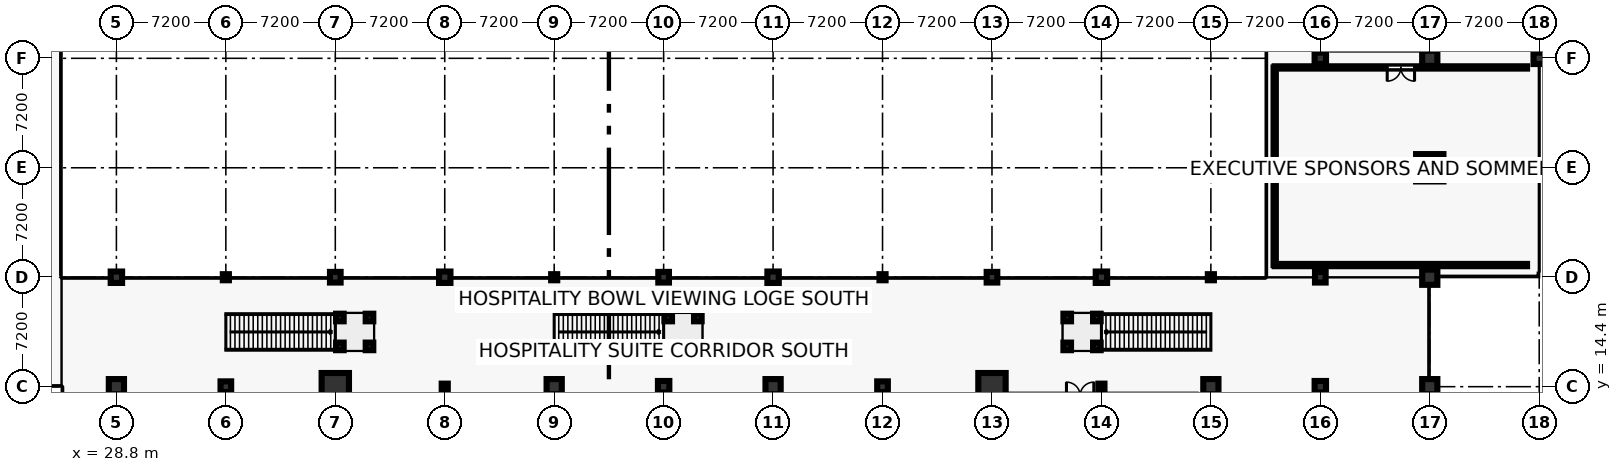
"""IFC4 building model, lengths in metres.
Left out: names, types, materials, properties, quantities, classifications, styles, units other than length and angle.
Written with IfcOpenShell. Run it as: python <this file> out.ifc"""

import sys

from ifc_helpers import new_model, si_unit, direction, frame, frame_2d, origin, origin_2d, place, context, subcontext, project, spatial, rectangle, hollow_rectangle, circle, extrude, element, fill, save


model = new_model("IFC4")
c1 = context("Model", 3, precision=1e-05, world=origin(), true_north=direction((0.0, 1.0)))
c2 = subcontext(c1, "Body", "Model", "MODEL_VIEW")
j1 = project(units=[si_unit("LENGTHUNIT", "METRE"), si_unit("PLANEANGLEUNIT", "RADIAN")], contexts=[c1])
p1 = place(None, origin())
s1 = spatial("IfcSite", under=j1, at=p1, CompositionType="ELEMENT")
p2 = place(p1, origin())
s2 = spatial("IfcBuilding", under=s1, at=p2, CompositionType="ELEMENT")
p3 = place(p2, frame((0.0, 0.0, 9.6)))
s3 = spatial("IfcBuildingStorey", under=s2, at=p3, CompositionType="ELEMENT", Elevation=9.6)
p4 = place(p3, frame((28.8, 14.4, 0.0), z_axis=(0.0, 0.0, 1.0), x_axis=(1.0, 0.0, 0.0)))
e1 = element("IfcColumn", 1, at=p4, inside=s3, PredefinedType="COLUMN", context=c2, shape_type="SweptSolid", body=[
    extrude(circle(Radius=0.5, at=origin_2d()), origin(), (0.0, 0.0, 1.0), 4.2),
])
p5 = place(p3, frame((28.8, 21.6, 0.0), z_axis=(0.0, 0.0, 1.0), x_axis=(1.0, 0.0, 0.0)))
e2 = element("IfcColumn", 2, at=p5, inside=s3, PredefinedType="COLUMN", context=c2, shape_type="SweptSolid", body=[
    extrude(rectangle(XDim=0.75, YDim=0.75, at=origin_2d()), origin(), (0.0, 0.0, 1.0), 4.2),
])
p6 = place(p3, frame((36.0, 14.4, 0.0), z_axis=(0.0, 0.0, 1.0), x_axis=(1.0, 0.0, 0.0)))
e3 = element("IfcColumn", 3, at=p6, inside=s3, PredefinedType="COLUMN", context=c2, shape_type="SweptSolid", body=[
    extrude(rectangle(XDim=0.7, YDim=0.7, at=origin_2d()), origin(), (0.0, 0.0, 1.0), 4.2),
])
p7 = place(p3, frame((36.0, 21.6, 0.0), z_axis=(0.0, 0.0, 1.0), x_axis=(1.0, 0.0, 0.0)))
e4 = element("IfcColumn", 4, at=p7, inside=s3, PredefinedType="COLUMN", context=c2, shape_type="SweptSolid", body=[
    extrude(hollow_rectangle(XDim=0.4, YDim=0.4, WallThickness=0.02, at=origin_2d()), origin(), (0.0, 0.0, 1.0), 4.2),
])
p8 = place(p3, frame((43.2, 14.4, 0.0), z_axis=(0.0, 0.0, 1.0), x_axis=(1.0, 0.0, 0.0)))
e5 = element("IfcColumn", 5, at=p8, inside=s3, PredefinedType="COLUMN", context=c2, shape_type="SweptSolid", body=[
    extrude(circle(Radius=0.9, at=origin_2d()), origin(), (0.0, 0.0, 1.0), 4.2),
])
p9 = place(p3, frame((43.2, 21.6, 0.0), z_axis=(0.0, 0.0, 1.0), x_axis=(1.0, 0.0, 0.0)))
e6 = element("IfcColumn", 6, at=p9, inside=s3, PredefinedType="COLUMN", context=c2, shape_type="SweptSolid", body=[
    extrude(rectangle(XDim=0.7, YDim=0.7, at=origin_2d()), origin(), (0.0, 0.0, 1.0), 4.2),
])
p10 = place(p3, frame((50.4, 14.4, 0.0), z_axis=(0.0, 0.0, 1.0), x_axis=(1.0, 0.0, 0.0)))
e7 = element("IfcColumn", 7, at=p10, inside=s3, PredefinedType="COLUMN", context=c2, shape_type="SweptSolid", body=[
    extrude(hollow_rectangle(XDim=0.4, YDim=0.4, WallThickness=0.02, at=origin_2d()), origin(), (0.0, 0.0, 1.0), 4.2),
])
p11 = place(p3, frame((50.4, 21.6, 0.0), z_axis=(0.0, 0.0, 1.0), x_axis=(1.0, 0.0, 0.0)))
e8 = element("IfcColumn", 8, at=p11, inside=s3, PredefinedType="COLUMN", context=c2, shape_type="SweptSolid", body=[
    extrude(rectangle(XDim=0.75, YDim=0.75, at=origin_2d()), origin(), (0.0, 0.0, 1.0), 4.2),
])
p12 = place(p3, frame((57.6, 14.4, 0.0), z_axis=(0.0, 0.0, 1.0), x_axis=(1.0, 0.0, 0.0)))
e9 = element("IfcColumn", 9, at=p12, inside=s3, PredefinedType="COLUMN", context=c2, shape_type="SweptSolid", body=[
    extrude(circle(Radius=0.5, at=origin_2d()), origin(), (0.0, 0.0, 1.0), 4.2),
])
p13 = place(p3, frame((57.6, 21.6, 0.0), z_axis=(0.0, 0.0, 1.0), x_axis=(1.0, 0.0, 0.0)))
e10 = element("IfcColumn", 10, at=p13, inside=s3, PredefinedType="COLUMN", context=c2, shape_type="SweptSolid", body=[
    extrude(hollow_rectangle(XDim=0.4, YDim=0.4, WallThickness=0.02, at=origin_2d()), origin(), (0.0, 0.0, 1.0), 4.2),
])
p14 = place(p3, frame((64.8, 14.4, 0.0), z_axis=(0.0, 0.0, 1.0), x_axis=(1.0, 0.0, 0.0)))
e11 = element("IfcColumn", 11, at=p14, inside=s3, PredefinedType="COLUMN", context=c2, shape_type="SweptSolid", body=[
    extrude(rectangle(XDim=0.75, YDim=0.75, at=origin_2d()), origin(), (0.0, 0.0, 1.0), 4.2),
])
p15 = place(p3, frame((64.8, 21.6, 0.0), z_axis=(0.0, 0.0, 1.0), x_axis=(1.0, 0.0, 0.0)))
e12 = element("IfcColumn", 12, at=p15, inside=s3, PredefinedType="COLUMN", context=c2, shape_type="SweptSolid", body=[
    extrude(rectangle(XDim=0.7, YDim=0.7, at=origin_2d()), origin(), (0.0, 0.0, 1.0), 4.2),
])
p16 = place(p3, frame((72.0, 14.4, 0.0), z_axis=(0.0, 0.0, 1.0), x_axis=(1.0, 0.0, 0.0)))
e13 = element("IfcColumn", 13, at=p16, inside=s3, PredefinedType="COLUMN", context=c2, shape_type="SweptSolid", body=[
    extrude(circle(Radius=0.5, at=origin_2d()), origin(), (0.0, 0.0, 1.0), 4.2),
])
p17 = place(p3, frame((72.0, 21.6, 0.0), z_axis=(0.0, 0.0, 1.0), x_axis=(1.0, 0.0, 0.0)))
e14 = element("IfcColumn", 14, at=p17, inside=s3, PredefinedType="COLUMN", context=c2, shape_type="SweptSolid", body=[
    extrude(rectangle(XDim=0.75, YDim=0.75, at=origin_2d()), origin(), (0.0, 0.0, 1.0), 4.2),
])
p18 = place(p3, frame((79.2, 14.4, 0.0), z_axis=(0.0, 0.0, 1.0), x_axis=(1.0, 0.0, 0.0)))
e15 = element("IfcColumn", 15, at=p18, inside=s3, PredefinedType="COLUMN", context=c2, shape_type="SweptSolid", body=[
    extrude(rectangle(XDim=0.7, YDim=0.7, at=origin_2d()), origin(), (0.0, 0.0, 1.0), 4.2),
])
p19 = place(p3, frame((79.2, 21.6, 0.0), z_axis=(0.0, 0.0, 1.0), x_axis=(1.0, 0.0, 0.0)))
e16 = element("IfcColumn", 16, at=p19, inside=s3, PredefinedType="COLUMN", context=c2, shape_type="SweptSolid", body=[
    extrude(hollow_rectangle(XDim=0.4, YDim=0.4, WallThickness=0.02, at=origin_2d()), origin(), (0.0, 0.0, 1.0), 4.2),
])
p20 = place(p3, frame((86.4, 14.4, 0.0), z_axis=(0.0, 0.0, 1.0), x_axis=(1.0, 0.0, 0.0)))
e17 = element("IfcColumn", 17, at=p20, inside=s3, PredefinedType="COLUMN", context=c2, shape_type="SweptSolid", body=[
    extrude(circle(Radius=0.9, at=origin_2d()), origin(), (0.0, 0.0, 1.0), 4.2),
])
p21 = place(p3, frame((86.4, 21.6, 0.0), z_axis=(0.0, 0.0, 1.0), x_axis=(1.0, 0.0, 0.0)))
e18 = element("IfcColumn", 18, at=p21, inside=s3, PredefinedType="COLUMN", context=c2, shape_type="SweptSolid", body=[
    extrude(rectangle(XDim=0.7, YDim=0.7, at=origin_2d()), origin(), (0.0, 0.0, 1.0), 4.2),
])
p22 = place(p3, frame((93.6, 14.4, 0.0), z_axis=(0.0, 0.0, 1.0), x_axis=(1.0, 0.0, 0.0)))
e19 = element("IfcColumn", 19, at=p22, inside=s3, PredefinedType="COLUMN", context=c2, shape_type="SweptSolid", body=[
    extrude(hollow_rectangle(XDim=0.4, YDim=0.4, WallThickness=0.02, at=origin_2d()), origin(), (0.0, 0.0, 1.0), 4.2),
])
p23 = place(p3, frame((93.6, 21.6, 0.0), z_axis=(0.0, 0.0, 1.0), x_axis=(1.0, 0.0, 0.0)))
e20 = element("IfcColumn", 20, at=p23, inside=s3, PredefinedType="COLUMN", context=c2, shape_type="SweptSolid", body=[
    extrude(rectangle(XDim=0.75, YDim=0.75, at=origin_2d()), origin(), (0.0, 0.0, 1.0), 4.2),
])
p24 = place(p3, frame((100.8, 14.4, 0.0), z_axis=(0.0, 0.0, 1.0), x_axis=(1.0, 0.0, 0.0)))
e21 = element("IfcColumn", 21, at=p24, inside=s3, PredefinedType="COLUMN", context=c2, shape_type="SweptSolid", body=[
    extrude(circle(Radius=0.5, at=origin_2d()), origin(), (0.0, 0.0, 1.0), 4.2),
])
p25 = place(p3, frame((100.8, 21.6, 0.0), z_axis=(0.0, 0.0, 1.0), x_axis=(1.0, 0.0, 0.0)))
e22 = element("IfcColumn", 22, at=p25, inside=s3, PredefinedType="COLUMN", context=c2, shape_type="SweptSolid", body=[
    extrude(hollow_rectangle(XDim=0.4, YDim=0.4, WallThickness=0.02, at=origin_2d()), origin(), (0.0, 0.0, 1.0), 4.2),
])
p26 = place(p3, frame((108.0, 14.4, 0.0), z_axis=(0.0, 0.0, 1.0), x_axis=(1.0, 0.0, 0.0)))
e23 = element("IfcColumn", 23, at=p26, inside=s3, PredefinedType="COLUMN", context=c2, shape_type="SweptSolid", body=[
    extrude(rectangle(XDim=0.75, YDim=0.75, at=origin_2d()), origin(), (0.0, 0.0, 1.0), 4.2),
])
p27 = place(p3, frame((108.0, 21.6, 0.0), z_axis=(0.0, 0.0, 1.0), x_axis=(1.0, 0.0, 0.0)))
e24 = element("IfcColumn", 24, at=p27, inside=s3, PredefinedType="COLUMN", context=c2, shape_type="SweptSolid", body=[
    extrude(rectangle(XDim=0.7, YDim=0.7, at=origin_2d()), origin(), (0.0, 0.0, 1.0), 4.2),
])
p28 = place(p3, frame((108.0, 28.8, 0.0), z_axis=(0.0, 0.0, 1.0), x_axis=(1.0, 0.0, 0.0)))
e25 = element("IfcColumn", 25, at=p28, inside=s3, PredefinedType="COLUMN", context=c2, shape_type="SweptSolid", body=[
    extrude(hollow_rectangle(XDim=0.4, YDim=0.4, WallThickness=0.02, at=origin_2d()), origin(), (0.0, 0.0, 1.0), 4.2),
])
p29 = place(p3, frame((108.0, 36.0, 0.0), z_axis=(0.0, 0.0, 1.0), x_axis=(1.0, 0.0, 0.0)))
e26 = element("IfcColumn", 26, at=p29, inside=s3, PredefinedType="COLUMN", context=c2, shape_type="SweptSolid", body=[
    extrude(rectangle(XDim=0.75, YDim=0.75, at=origin_2d()), origin(), (0.0, 0.0, 1.0), 4.2),
])
for number, where, z_axis, x_axis in (
    (27, (115.2, 14.4, 0.0), (0.0, 0.0, 1.0), (1.0, 0.0, 0.0)),
    (28, (115.2, 21.6, 0.0), (0.0, 0.0, 1.0), (1.0, 0.0, 0.0)),
):
    element("IfcColumn", number, at=place(p3, frame(where, z_axis=z_axis, x_axis=x_axis)), inside=s3, PredefinedType="COLUMN", context=c2, shape_type="SweptSolid", body=[
        extrude(circle(Radius=0.5, at=origin_2d()), origin(), (0.0, 0.0, 1.0), 4.2),
    ])
p30 = place(p3, frame((115.2, 28.8, 0.0), z_axis=(0.0, 0.0, 1.0), x_axis=(1.0, 0.0, 0.0)))
e29 = element("IfcColumn", 29, at=p30, inside=s3, PredefinedType="COLUMN", context=c2, shape_type="SweptSolid", body=[
    extrude(circle(Radius=0.9, at=origin_2d()), origin(), (0.0, 0.0, 1.0), 4.2),
])
p31 = place(p3, frame((115.2, 36.0, 0.0), z_axis=(0.0, 0.0, 1.0), x_axis=(1.0, 0.0, 0.0)))
e30 = element("IfcColumn", 30, at=p31, inside=s3, PredefinedType="COLUMN", context=c2, shape_type="SweptSolid", body=[
    extrude(circle(Radius=0.5, at=origin_2d()), origin(), (0.0, 0.0, 1.0), 4.2),
])
p32 = place(p3, frame((122.4, 28.8, 0.0), z_axis=(0.0, 0.0, 1.0), x_axis=(1.0, 0.0, 0.0)))
e31 = element("IfcColumn", 31, at=p32, inside=s3, PredefinedType="COLUMN", context=c2, shape_type="SweptSolid", body=[
    extrude(hollow_rectangle(XDim=0.4, YDim=0.4, WallThickness=0.02, at=origin_2d()), origin(), (0.0, 0.0, 1.0), 4.2),
])
p33 = place(p3, frame((122.4, 36.0, 0.0), z_axis=(0.0, 0.0, 1.0), x_axis=(1.0, 0.0, 0.0)))
e32 = element("IfcColumn", 32, at=p33, inside=s3, PredefinedType="COLUMN", context=c2, shape_type="SweptSolid", body=[
    extrude(rectangle(XDim=0.75, YDim=0.75, at=origin_2d()), origin(), (0.0, 0.0, 1.0), 4.2),
])
for number, where, z_axis, x_axis in (
    (33, (43.5, 17.05, 0.0), (0.0, 0.0, 1.0), (1.0, 0.0, 0.0)),
    (34, (45.45, 17.05, 0.0), (0.0, 0.0, 1.0), (1.0, 0.0, 0.0)),
    (35, (43.5, 18.95, 0.0), (0.0, 0.0, 1.0), (1.0, 0.0, 0.0)),
    (36, (45.45, 18.95, 0.0), (0.0, 0.0, 1.0), (1.0, 0.0, 0.0)),
    (37, (65.1, 17.05, 0.0), (0.0, 0.0, 1.0), (1.0, 0.0, 0.0)),
    (38, (67.05, 17.05, 0.0), (0.0, 0.0, 1.0), (1.0, 0.0, 0.0)),
    (39, (65.1, 18.95, 0.0), (0.0, 0.0, 1.0), (1.0, 0.0, 0.0)),
    (40, (67.05, 18.95, 0.0), (0.0, 0.0, 1.0), (1.0, 0.0, 0.0)),
    (41, (91.35, 17.05, 0.0), (0.0, 0.0, 1.0), (1.0, 0.0, 0.0)),
    (42, (93.3, 17.05, 0.0), (0.0, 0.0, 1.0), (1.0, 0.0, 0.0)),
    (43, (91.35, 18.95, 0.0), (0.0, 0.0, 1.0), (1.0, 0.0, 0.0)),
    (44, (93.3, 18.95, 0.0), (0.0, 0.0, 1.0), (1.0, 0.0, 0.0)),
):
    element("IfcColumn", number, at=place(p3, frame(where, z_axis=z_axis, x_axis=x_axis)), inside=s3, PredefinedType="COLUMN", context=c2, shape_type="SweptSolid", body=[
        extrude(rectangle(XDim=0.5, YDim=0.5, at=origin_2d()), origin(), (0.0, 0.0, 1.0), 3.96),
    ])
p34 = place(p3, frame((105.0, 22.4, 0.0), z_axis=(0.0, 0.0, 1.0), x_axis=(1.0, 0.0, 0.0)))
e45 = element("IfcWall", 45, at=p34, inside=s3, PredefinedType="PARTITIONING", context=c2, shape_type="SweptSolid", body=[
    extrude(rectangle(XDim=16.6, YDim=0.15, at=frame_2d((8.3, 0.0))), origin(), (0.0, 0.0, 1.0), 2.94),
])
p35 = place(p3, frame((121.6, 35.4, 0.0), z_axis=(0.0, 0.0, 1.0), x_axis=(-1.0, 0.0, 0.0)))
e46 = element("IfcWall", 46, at=p35, inside=s3, PredefinedType="PARTITIONING", context=c2, shape_type="SweptSolid", body=[
    extrude(rectangle(XDim=16.6, YDim=0.15, at=frame_2d((8.3, 0.0))), origin(), (0.0, 0.0, 1.0), 2.94),
])
p36 = place(p35, frame((7.4, 0.0, 0.0)))
e47 = element("IfcOpeningElement", 47, at=p36, cuts=e46, PredefinedType="OPENING", context=c2, shape_type="SweptSolid", body=[
    extrude(rectangle(XDim=1.8, YDim=2.3, at=frame_2d((0.9, 1.15))), frame((0.0, 0.085, 0.0), z_axis=(0.0, -1.0, 0.0), x_axis=(1.0, 0.0, 0.0)), (0.0, 0.0, 1.0), 0.17),
])
p37 = place(p3, frame((105.0, 35.4, 0.0), z_axis=(0.0, 0.0, 1.0), x_axis=(0.0, -1.0, 0.0)))
e48 = element("IfcWall", 48, at=p37, inside=s3, PredefinedType="PARTITIONING", context=c2, shape_type="SweptSolid", body=[
    extrude(rectangle(XDim=13.0, YDim=0.15, at=frame_2d((6.5, 0.0))), origin(), (0.0, 0.0, 1.0), 2.94),
])
p38 = place(p36, origin())
e49 = element("IfcDoor", 49, at=p38, inside=s3, OperationType="DOUBLE_DOOR_SINGLE_SWING", PredefinedType="DOOR", context=c2, shape_type="SweptSolid", body=[
    extrude(rectangle(XDim=1.8, YDim=2.3, at=frame_2d((0.9, 1.15))), frame((0.0, 0.025, 0.0), z_axis=(0.0, -1.0, 0.0), x_axis=(1.0, 0.0, 0.0)), (0.0, 0.0, 1.0), 0.05),
])
fill(e47, e49)
save(model, sys.argv[1])
